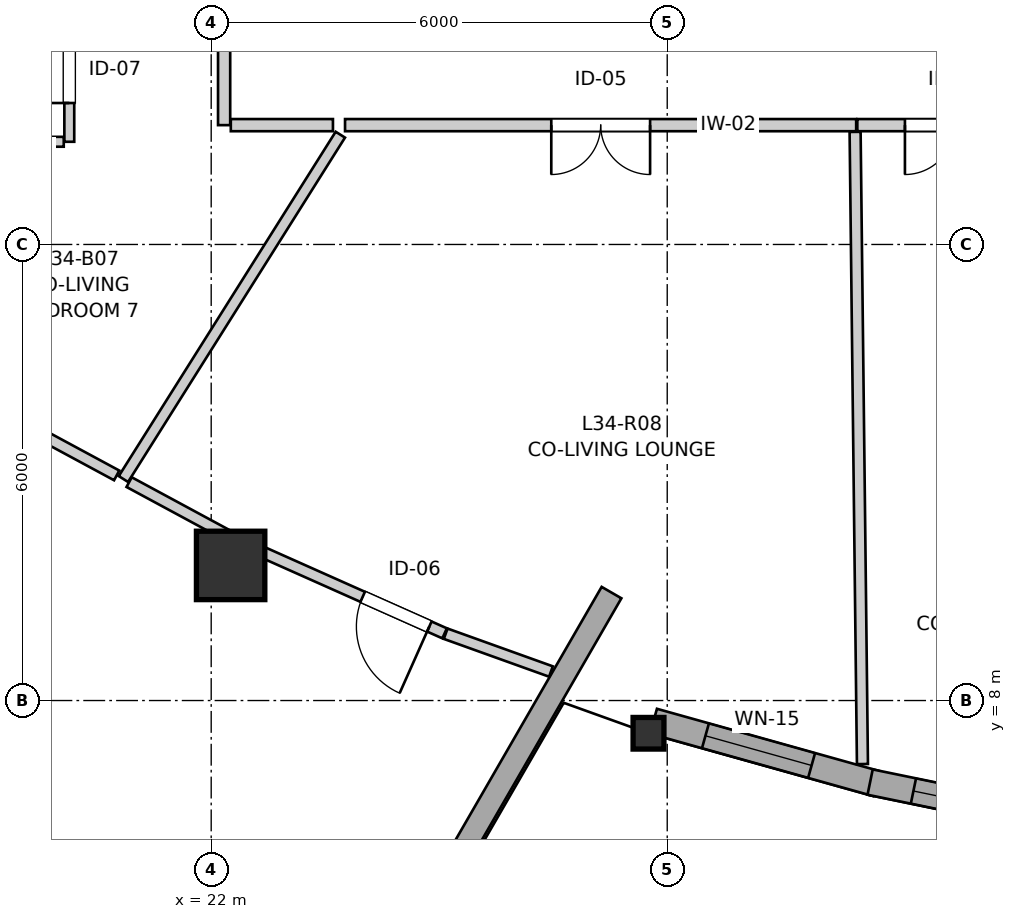
"""IFC4 building model, lengths in metres.
Left out: names, types, materials, properties, quantities, classifications, styles, units other than length and angle.
Written with IfcOpenShell. Run it as: python <this file> out.ifc"""

import sys

from ifc_helpers import new_model, si_unit, direction, frame, frame_2d, origin, origin_2d, place, context, subcontext, project, spatial, rectangle, i_section, extrude, source, transform, mapped, element, fill, save


model = new_model("IFC4")
c1 = context("Model", 3, precision=1e-05, world=origin(), true_north=direction((0.0, 1.0)))
c2 = subcontext(c1, "Body", "Model", "MODEL_VIEW")
j1 = project(units=[si_unit("LENGTHUNIT", "METRE"), si_unit("PLANEANGLEUNIT", "RADIAN")], contexts=[c1])
p1 = place(None, origin())
s1 = spatial("IfcSite", under=j1, at=p1, CompositionType="ELEMENT")
p2 = place(p1, origin())
s2 = spatial("IfcBuilding", under=s1, at=p2, CompositionType="ELEMENT")
p3 = place(p2, frame((0.0, 0.0, 115.2)))
s3 = spatial("IfcBuildingStorey", under=s2, at=p3, CompositionType="ELEMENT", Elevation=115.2)
m1 = source(origin(), c2, "Body", "SweptSolid", [
    extrude(rectangle(XDim=0.9, YDim=0.9, at=origin_2d()), origin(), (0.0, 0.0, 1.0), 2.95),
])
p4 = place(p3, frame((22.256, 9.778, 0.0), z_axis=(0.0, 0.0, 1.0), x_axis=(1.0, 0.0, 0.0)))
e1 = element("IfcColumn", 1, at=p4, inside=s3, PredefinedType="COLUMN", context=c2, shape_type="MappedRepresentation", body=[
    mapped(m1, transform((0.0, 0.0, 0.0), x_axis=(1.0, 0.0, 0.0), y_axis=(0.0, 1.0, 0.0), z_axis=(0.0, 0.0, 1.0), scale=1.0)),
])
m2 = source(origin(), c2, "Body", "SweptSolid", [
    extrude(i_section(OverallWidth=0.406, OverallDepth=0.416, WebThickness=0.027, FlangeThickness=0.044, FilletRadius=0.015, at=origin_2d()), origin(), (0.0, 0.0, 1.0), 2.95),
])
p5 = place(p3, frame((27.754, 7.569, 0.0), z_axis=(0.0, 0.0, 1.0), x_axis=(1.0, 0.0, 0.0)))
e2 = element("IfcColumn", 2, at=p5, inside=s3, PredefinedType="PILASTER", context=c2, shape_type="MappedRepresentation", body=[
    mapped(m2, transform((0.0, 0.0, 0.0), x_axis=(1.0, 0.0, 0.0), y_axis=(0.0, 1.0, 0.0), z_axis=(0.0, 0.0, 1.0), scale=1.0)),
])
p6 = place(p3, frame((27.819, 7.728, 0.0), z_axis=(0.0, 0.0, 1.0), x_axis=(0.963032186905, -0.269386352632, 0.0)))
e3 = element("IfcWall", 3, at=p6, inside=s3, PredefinedType="SOLIDWALL", context=c2, shape_type="SweptSolid", body=[
    extrude(rectangle(XDim=3.049, YDim=0.34, at=frame_2d((1.524, 0.0))), origin(), (0.0, 0.0, 1.0), 2.48),
])
p7 = place(p6, frame((0.71, 0.0, 0.82)))
e4 = element("IfcOpeningElement", 4, at=p7, cuts=e3, PredefinedType="OPENING", context=c2, shape_type="SweptSolid", body=[
    extrude(rectangle(XDim=1.45, YDim=1.25, at=frame_2d((0.725, 0.625))), frame((0.0, 0.18, 0.0), z_axis=(0.0, -1.0, 0.0), x_axis=(1.0, 0.0, 0.0)), (0.0, 0.0, 1.0), 0.36),
])
p8 = place(p3, frame((30.67, 6.927, 0.0), z_axis=(0.0, 0.0, 1.0), x_axis=(0.979422345081, -0.201821381317, 0.0)))
e5 = element("IfcWall", 5, at=p8, inside=s3, PredefinedType="SOLIDWALL", context=c2, shape_type="SweptSolid", body=[
    extrude(rectangle(XDim=2.903, YDim=0.34, at=frame_2d((1.452, 0.0))), origin(), (0.0, 0.0, 1.0), 2.48),
])
p9 = place(p8, frame((0.582, 0.0, 0.82)))
e6 = element("IfcOpeningElement", 6, at=p9, cuts=e5, PredefinedType="OPENING", context=c2, shape_type="SweptSolid", body=[
    extrude(rectangle(XDim=1.75, YDim=1.3, at=frame_2d((0.875, 0.65))), frame((0.0, 0.18, 0.0), z_axis=(0.0, -1.0, 0.0), x_axis=(1.0, 0.0, 0.0)), (0.0, 0.0, 1.0), 0.36),
])
p10 = place(p3, frame((27.267, 9.42, 0.0), z_axis=(0.0, 0.0, 1.0), x_axis=(-0.500001212782, -0.866024703583, 0.0)))
e7 = element("IfcWall", 7, at=p10, inside=s3, PredefinedType="SOLIDWALL", context=c2, shape_type="SweptSolid", body=[
    extrude(rectangle(XDim=20.09, YDim=0.3, at=frame_2d((10.045, 0.0))), origin(), (0.0, 0.0, 1.0), 2.13),
])
p11 = place(p3, frame((30.486, 15.57, 0.0), z_axis=(0.0, 0.0, 1.0), x_axis=(-1.0, 0.0, 0.0)))
e8 = element("IfcWall", 8, at=p11, inside=s3, PredefinedType="PARTITIONING", context=c2, shape_type="SweptSolid", body=[
    extrude(rectangle(XDim=6.725, YDim=0.16, at=frame_2d((3.363, 0.0))), origin(), (0.0, 0.0, 1.0), 2.95),
])
p12 = place(p11, frame((2.711, 0.0, 0.0)))
e9 = element("IfcOpeningElement", 9, at=p12, cuts=e8, PredefinedType="OPENING", context=c2, shape_type="SweptSolid", body=[
    extrude(rectangle(XDim=1.3, YDim=2.1, at=frame_2d((0.65, 1.05))), frame((0.0, 0.09, 0.0), z_axis=(0.0, -1.0, 0.0), x_axis=(1.0, 0.0, 0.0)), (0.0, 0.0, 1.0), 0.18),
])
p13 = place(p3, frame((22.17, 15.57, 0.0), z_axis=(0.0, 0.0, 1.0), x_axis=(0.0, 1.0, 0.0)))
e10 = element("IfcWall", 10, at=p13, inside=s3, PredefinedType="PARTITIONING", context=c2, shape_type="SweptSolid", body=[
    extrude(rectangle(XDim=4.555, YDim=0.16, at=frame_2d((2.277, 0.0))), origin(), (0.0, 0.0, 1.0), 2.95),
])
p14 = place(p13, frame((1.808, 0.0, 0.0)))
e11 = element("IfcOpeningElement", 11, at=p14, cuts=e10, PredefinedType="OPENING", context=c2, shape_type="SweptSolid", body=[
    extrude(rectangle(XDim=0.92, YDim=2.1, at=frame_2d((0.46, 1.05))), frame((0.0, 0.09, 0.0), z_axis=(0.0, -1.0, 0.0), x_axis=(1.0, 0.0, 0.0)), (0.0, 0.0, 1.0), 0.18),
])
p15 = place(p3, frame((25.071, 8.884, 0.0), z_axis=(0.0, 0.0, 1.0), x_axis=(-0.913404708383, 0.407052623997, 0.0)))
e12 = element("IfcWall", 12, at=p15, inside=s3, PredefinedType="PARTITIONING", context=c2, shape_type="SweptSolid", body=[
    extrude(rectangle(XDim=2.923, YDim=0.145, at=frame_2d((1.462, 0.0))), origin(), (0.0, 0.0, 1.0), 2.468),
])
p16 = place(p15, frame((0.22, 0.0, 0.0)))
e13 = element("IfcOpeningElement", 13, at=p16, cuts=e12, PredefinedType="OPENING", context=c2, shape_type="SweptSolid", body=[
    extrude(rectangle(XDim=0.96, YDim=2.1, at=frame_2d((0.48, 1.05))), frame((0.0, 0.083, 0.0), z_axis=(0.0, -1.0, 0.0), x_axis=(1.0, 0.0, 0.0)), (0.0, 0.0, 1.0), 0.165),
])
p17 = place(p3, frame((33.099, 15.57, 0.0), z_axis=(0.0, 0.0, 1.0), x_axis=(-1.0, 0.0, 0.0)))
e14 = element("IfcWall", 14, at=p17, inside=s3, PredefinedType="PARTITIONING", context=c2, shape_type="SweptSolid", body=[
    extrude(rectangle(XDim=2.598, YDim=0.16, at=frame_2d((1.299, 0.0))), origin(), (0.0, 0.0, 1.0), 2.95),
])
p18 = place(p17, frame((0.671, 0.0, 0.0)))
e15 = element("IfcOpeningElement", 15, at=p18, cuts=e14, PredefinedType="OPENING", context=c2, shape_type="SweptSolid", body=[
    extrude(rectangle(XDim=1.3, YDim=2.1, at=frame_2d((0.65, 1.05))), frame((0.0, 0.09, 0.0), z_axis=(0.0, -1.0, 0.0), x_axis=(1.0, 0.0, 0.0)), (0.0, 0.0, 1.0), 0.18),
])
p19 = place(p3, frame((20.133, 15.351, 0.0), z_axis=(0.0, 0.0, 1.0), x_axis=(0.0, 1.0, 0.0)))
e16 = element("IfcWall", 16, at=p19, inside=s3, PredefinedType="PARTITIONING", context=c2, shape_type="SweptSolid", body=[
    extrude(rectangle(XDim=1.9, YDim=0.13, at=frame_2d((0.95, 0.0))), origin(), (0.0, 0.0, 1.0), 2.95),
])
p20 = place(p19, frame((0.51, 0.0, 0.0)))
e17 = element("IfcOpeningElement", 17, at=p20, cuts=e16, PredefinedType="OPENING", context=c2, shape_type="SweptSolid", body=[
    extrude(rectangle(XDim=0.88, YDim=2.05, at=frame_2d((0.44, 1.025))), frame((0.0, 0.075, 0.0), z_axis=(0.0, -1.0, 0.0), x_axis=(1.0, 0.0, 0.0)), (0.0, 0.0, 1.0), 0.15),
])
p21 = place(p3, frame((14.966, 14.915, 0.0), z_axis=(0.0, 0.0, 1.0), x_axis=(0.811310715309, 0.584615192434, 0.0)))
e18 = element("IfcWall", 18, at=p21, inside=s3, PredefinedType="PARTITIONING", context=c2, shape_type="SweptSolid", body=[
    extrude(rectangle(XDim=8.72, YDim=0.145, at=frame_2d((4.36, 0.0))), origin(), (0.0, 0.0, 1.0), 2.118),
])
p22 = place(p3, frame((30.472, 15.481, 0.0), z_axis=(0.0, 0.0, 1.0), x_axis=(0.011623708307, -0.999932442421, 0.0)))
e19 = element("IfcWall", 19, at=p22, inside=s3, PredefinedType="PARTITIONING", context=c2, shape_type="SweptSolid", body=[
    extrude(rectangle(XDim=8.317, YDim=0.145, at=frame_2d((4.159, 0.0))), origin(), (0.0, 0.0, 1.0), 2.95),
])
p23 = place(p3, frame((20.845, 10.914, 0.0), z_axis=(0.0, 0.0, 1.0), x_axis=(0.533007953382, 0.846110230189, 0.0)))
e20 = element("IfcWall", 20, at=p23, inside=s3, PredefinedType="PARTITIONING", context=c2, shape_type="SweptSolid", body=[
    extrude(rectangle(XDim=5.354, YDim=0.145, at=frame_2d((2.677, 0.0))), origin(), (0.0, 0.0, 1.0), 2.95),
])
p24 = place(p3, frame((18.406, 15.351, 0.0), z_axis=(0.0, 0.0, 1.0), x_axis=(1.0, 0.0, 0.0)))
e21 = element("IfcWall", 21, at=p24, inside=s3, PredefinedType="PARTITIONING", context=c2, shape_type="SweptSolid", body=[
    extrude(rectangle(XDim=1.654, YDim=0.13, at=frame_2d((0.827, 0.0))), origin(), (0.0, 0.0, 1.0), 2.95),
])
p25 = place(p3, frame((20.92, 10.873, 0.0), z_axis=(0.0, 0.0, 1.0), x_axis=(0.879929881444, -0.475103571595, 0.0)))
e22 = element("IfcWall", 22, at=p25, inside=s3, PredefinedType="PARTITIONING", context=c2, shape_type="SweptSolid", body=[
    extrude(rectangle(XDim=1.667, YDim=0.145, at=frame_2d((0.834, 0.0))), origin(), (0.0, 0.0, 1.0), 2.468),
])
p26 = place(p3, frame((22.258, 15.57, 0.0), z_axis=(0.0, 0.0, 1.0), x_axis=(1.0, 0.0, 0.0)))
e23 = element("IfcWall", 23, at=p26, inside=s3, PredefinedType="PARTITIONING", context=c2, shape_type="SweptSolid", body=[
    extrude(rectangle(XDim=1.344, YDim=0.16, at=frame_2d((0.672, 0.0))), origin(), (0.0, 0.0, 1.0), 2.95),
])
p27 = place(p3, frame((25.085, 8.879, 0.0), z_axis=(0.0, 0.0, 1.0), x_axis=(0.941166260093, -0.337943887151, 0.0)))
e24 = element("IfcWall", 24, at=p27, inside=s3, PredefinedType="PARTITIONING", context=c2, shape_type="SweptSolid", body=[
    extrude(rectangle(XDim=1.472, YDim=0.145, at=frame_2d((0.736, 0.0))), origin(), (0.0, 0.0, 1.0), 2.468),
])
p28 = place(p3, frame((19.857, 11.447, 0.0), z_axis=(0.0, 0.0, 1.0), x_axis=(0.8800411893, -0.474897362738, 0.0)))
e25 = element("IfcWall", 25, at=p28, inside=s3, PredefinedType="PARTITIONING", context=c2, shape_type="SweptSolid", body=[
    extrude(rectangle(XDim=1.022, YDim=0.145, at=frame_2d((0.511, 0.0))), origin(), (0.0, 0.0, 1.0), 2.468),
])
m3 = source(origin(), c2, "Body", "SweptSolid", [
    extrude(rectangle(XDim=1.45, YDim=1.25, at=frame_2d((0.725, 0.625))), frame((0.0, 0.03, 0.0), z_axis=(0.0, -1.0, 0.0), x_axis=(1.0, 0.0, 0.0)), (0.0, 0.0, 1.0), 0.06),
])
p29 = place(p7, origin())
e26 = element("IfcWindow", 26, at=p29, inside=s3, PartitioningType="SINGLE_PANEL", PredefinedType="WINDOW", context=c2, shape_type="MappedRepresentation", body=[
    mapped(m3, transform((0.0, 0.0, 0.0), x_axis=(1.0, 0.0, 0.0), y_axis=(0.0, 1.0, 0.0), z_axis=(0.0, 0.0, 1.0), scale=1.0)),
])
fill(e4, e26)
m4 = source(origin(), c2, "Body", "SweptSolid", [
    extrude(rectangle(XDim=1.75, YDim=1.3, at=frame_2d((0.875, 0.65))), frame((0.0, 0.03, 0.0), z_axis=(0.0, -1.0, 0.0), x_axis=(1.0, 0.0, 0.0)), (0.0, 0.0, 1.0), 0.06),
])
p30 = place(p9, origin())
e27 = element("IfcWindow", 27, at=p30, inside=s3, PartitioningType="SINGLE_PANEL", PredefinedType="WINDOW", context=c2, shape_type="MappedRepresentation", body=[
    mapped(m4, transform((0.0, 0.0, 0.0), x_axis=(1.0, 0.0, 0.0), y_axis=(0.0, 1.0, 0.0), z_axis=(0.0, 0.0, 1.0), scale=1.0)),
])
fill(e6, e27)
m5 = source(origin(), c2, "Body", "SweptSolid", [
    extrude(rectangle(XDim=1.3, YDim=2.1, at=frame_2d((0.65, 1.05))), frame((0.0, 0.025, 0.0), z_axis=(0.0, -1.0, 0.0), x_axis=(1.0, 0.0, 0.0)), (0.0, 0.0, 1.0), 0.05),
])
p31 = place(p12, origin())
e28 = element("IfcDoor", 28, at=p31, inside=s3, OperationType="DOUBLE_DOOR_SINGLE_SWING", PredefinedType="DOOR", context=c2, shape_type="MappedRepresentation", body=[
    mapped(m5, transform((0.0, 0.0, 0.0), x_axis=(1.0, 0.0, 0.0), y_axis=(0.0, 1.0, 0.0), z_axis=(0.0, 0.0, 1.0), scale=1.0)),
])
fill(e9, e28)
m6 = source(origin(), c2, "Body", "SweptSolid", [
    extrude(rectangle(XDim=0.96, YDim=2.1, at=frame_2d((0.48, 1.05))), frame((0.0, 0.025, 0.0), z_axis=(0.0, -1.0, 0.0), x_axis=(1.0, 0.0, 0.0)), (0.0, 0.0, 1.0), 0.05),
])
p32 = place(p16, origin())
e29 = element("IfcDoor", 29, at=p32, inside=s3, OperationType="SINGLE_SWING_LEFT", PredefinedType="DOOR", context=c2, shape_type="MappedRepresentation", body=[
    mapped(m6, transform((0.0, 0.0, 0.0), x_axis=(1.0, 0.0, 0.0), y_axis=(0.0, 1.0, 0.0), z_axis=(0.0, 0.0, 1.0), scale=1.0)),
])
fill(e13, e29)
p33 = place(p18, origin())
e30 = element("IfcDoor", 30, at=p33, inside=s3, OperationType="DOUBLE_DOOR_SINGLE_SWING", PredefinedType="DOOR", context=c2, shape_type="MappedRepresentation", body=[
    mapped(m5, transform((0.0, 0.0, 0.0), x_axis=(1.0, 0.0, 0.0), y_axis=(0.0, 1.0, 0.0), z_axis=(0.0, 0.0, 1.0), scale=1.0)),
])
fill(e15, e30)
m7 = source(origin(), c2, "Body", "SweptSolid", [
    extrude(rectangle(XDim=0.88, YDim=2.05, at=frame_2d((0.44, 1.025))), frame((0.0, 0.025, 0.0), z_axis=(0.0, -1.0, 0.0), x_axis=(1.0, 0.0, 0.0)), (0.0, 0.0, 1.0), 0.05),
])
p34 = place(p20, origin())
e31 = element("IfcDoor", 31, at=p34, inside=s3, OperationType="SINGLE_SWING_LEFT", PredefinedType="DOOR", context=c2, shape_type="MappedRepresentation", body=[
    mapped(m7, transform((0.0, 0.0, 0.0), x_axis=(1.0, 0.0, 0.0), y_axis=(0.0, 1.0, 0.0), z_axis=(0.0, 0.0, 1.0), scale=1.0)),
])
fill(e17, e31)
save(model, sys.argv[1])
